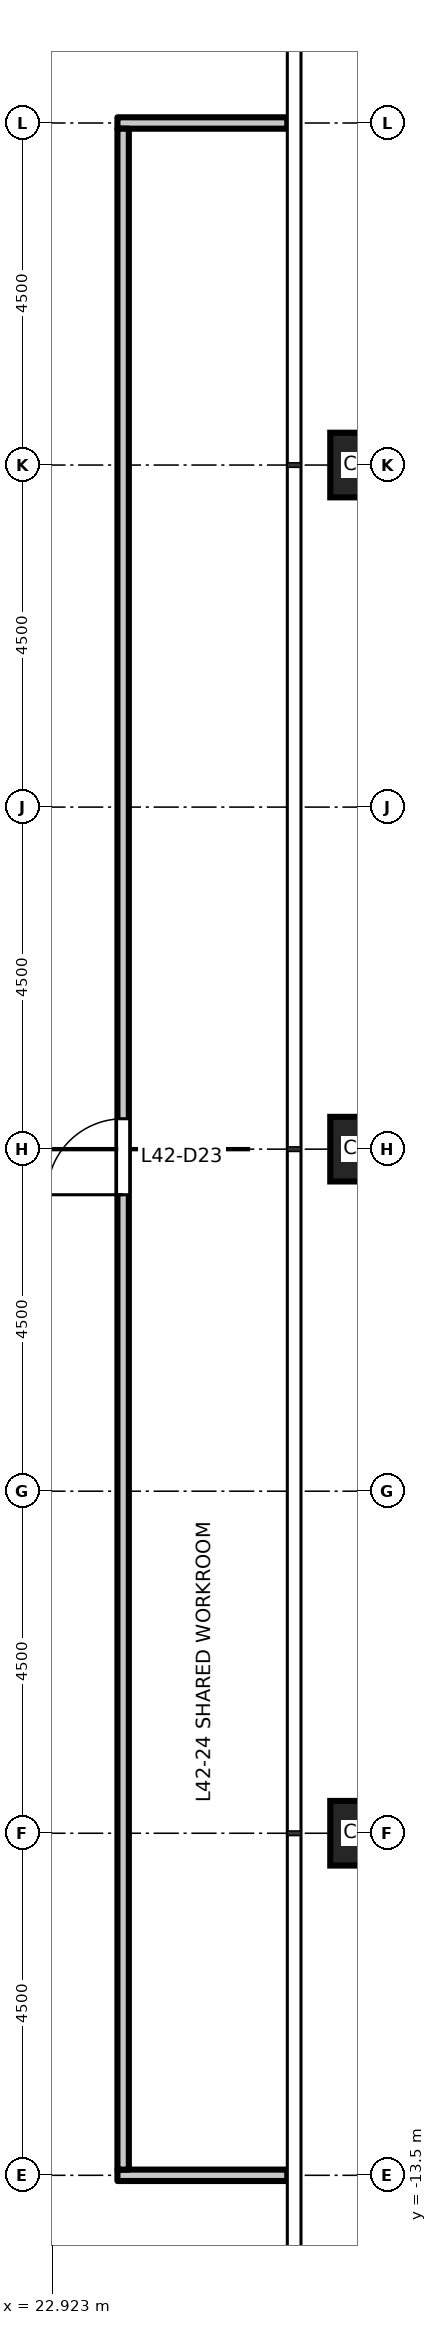
"""IFC4 building model, lengths in metres.
Left out: names, types, materials, properties, quantities, classifications, styles, units other than length and angle.
Written with IfcOpenShell. Run it as: python <this file> out.ifc"""

import sys

from ifc_helpers import new_model, si_unit, direction, frame, frame_2d, origin, origin_2d, place, context, subcontext, project, spatial, rectangle, hollow_rectangle, extrude, element, fill, save


model = new_model("IFC4")
c1 = context("Model", 3, precision=1e-05, world=origin(), true_north=direction((0.0, 1.0)))
c2 = subcontext(c1, "Body", "Model", "MODEL_VIEW")
j1 = project(units=[si_unit("LENGTHUNIT", "METRE"), si_unit("PLANEANGLEUNIT", "RADIAN")], contexts=[c1])
p1 = place(None, origin())
s1 = spatial("IfcSite", under=j1, at=p1, CompositionType="ELEMENT")
p2 = place(p1, origin())
s2 = spatial("IfcBuilding", under=s1, at=p2, CompositionType="ELEMENT")
p3 = place(p2, frame((0.0, 0.0, 197.2)))
s3 = spatial("IfcBuildingStorey", under=s2, at=p3, CompositionType="ELEMENT", Elevation=197.2)
for number, where, z_axis, x_axis in (
    (1, (27.0, -9.0, 0.0), (0.0, 0.0, 1.0), (1.0, 0.0, 0.0)),
    (2, (27.0, 0.0, 0.0), (0.0, 0.0, 1.0), (1.0, 0.0, 0.0)),
    (3, (27.0, 9.0, 0.0), (0.0, 0.0, 1.0), (1.0, 0.0, 0.0)),
):
    element("IfcColumn", number, at=place(p3, frame(where, z_axis=z_axis, x_axis=x_axis)), inside=s3, PredefinedType="COLUMN", context=c2, shape_type="SweptSolid", body=[
        extrude(hollow_rectangle(XDim=0.85, YDim=0.85, WallThickness=0.05, at=origin_2d()), origin(), (0.0, 0.0, 1.0), 4.5),
    ])
p4 = place(p3, frame((23.775, -13.5, 0.0), z_axis=(0.0, 0.0, 1.0), x_axis=(1.0, 0.0, 0.0)))
e4 = element("IfcWall", 4, at=p4, inside=s3, PredefinedType="PARTITIONING", context=c2, shape_type="SweptSolid", body=[
    extrude(rectangle(XDim=2.235, YDim=0.15, at=frame_2d((1.118, 0.0))), origin(), (0.0, 0.0, 1.0), 3.95),
])
p5 = place(p3, frame((23.775, 13.5, 0.0), z_axis=(0.0, 0.0, 1.0), x_axis=(1.0, 0.0, 0.0)))
e5 = element("IfcWall", 5, at=p5, inside=s3, PredefinedType="PARTITIONING", context=c2, shape_type="SweptSolid", body=[
    extrude(rectangle(XDim=2.235, YDim=0.15, at=frame_2d((1.118, 0.0))), origin(), (0.0, 0.0, 1.0), 4.35),
])
p6 = place(p3, frame((23.85, -13.425, 0.0), z_axis=(0.0, 0.0, 1.0), x_axis=(0.0, 1.0, 0.0)))
e6 = element("IfcWall", 6, at=p6, inside=s3, PredefinedType="PARTITIONING", context=c2, shape_type="SweptSolid", body=[
    extrude(rectangle(XDim=26.85, YDim=0.15, at=frame_2d((13.425, 0.0))), origin(), (0.0, 0.0, 1.0), 4.35),
])
p7 = place(p6, frame((12.825, 0.0, 0.0)))
e7 = element("IfcOpeningElement", 7, at=p7, cuts=e6, PredefinedType="OPENING", context=c2, shape_type="SweptSolid", body=[
    extrude(rectangle(XDim=1.0, YDim=2.1, at=frame_2d((0.5, 1.05))), frame((0.0, 0.085, 0.0), z_axis=(0.0, -1.0, 0.0), x_axis=(1.0, 0.0, 0.0)), (0.0, 0.0, 1.0), 0.17),
])
p8 = place(p7, origin())
e8 = element("IfcDoor", 8, at=p8, inside=s3, OperationType="SINGLE_SWING_LEFT", PredefinedType="DOOR", context=c2, shape_type="SweptSolid", body=[
    extrude(rectangle(XDim=1.0, YDim=2.1, at=frame_2d((0.5, 1.05))), frame((0.0, 0.025, 0.0), z_axis=(0.0, -1.0, 0.0), x_axis=(1.0, 0.0, 0.0)), (0.0, 0.0, 1.0), 0.05),
])
fill(e7, e8)
save(model, sys.argv[1])
